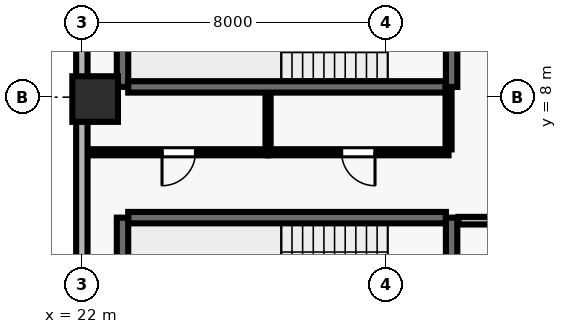
"""IFC4 building model, lengths in metres.
Left out: names, types, materials, properties, quantities, classifications, styles, units other than length and angle.
Written with IfcOpenShell. Run it as: python <this file> out.ifc"""

import sys

from ifc_helpers import new_model, si_unit, direction, frame, frame_2d, origin, origin_2d, place, context, subcontext, project, spatial, rectangle, extrude, element, fill, save


model = new_model("IFC4")
c1 = context("Model", 3, precision=1e-05, world=origin(), true_north=direction((0.0, 1.0)))
c2 = subcontext(c1, "Body", "Model", "MODEL_VIEW")
j1 = project(units=[si_unit("LENGTHUNIT", "METRE"), si_unit("PLANEANGLEUNIT", "RADIAN")], contexts=[c1])
p1 = place(None, origin())
s1 = spatial("IfcSite", under=j1, at=p1, CompositionType="ELEMENT")
p2 = place(p1, origin())
s2 = spatial("IfcBuilding", under=s1, at=p2, CompositionType="ELEMENT")
p3 = place(p2, frame((0.0, 0.0, 134.6)))
s3 = spatial("IfcBuildingStorey", under=s2, at=p3, CompositionType="ELEMENT", Elevation=134.6)
p4 = place(p3, frame((22.35, 7.95, 0.0), z_axis=(0.0, 0.0, 1.0), x_axis=(1.0, 0.0, 0.0)))
e1 = element("IfcColumn", 1, at=p4, inside=s3, PredefinedType="COLUMN", context=c2, shape_type="SweptSolid", body=[
    extrude(rectangle(XDim=1.2, YDim=1.2, at=origin_2d()), origin(), (0.0, 0.0, 1.0), 3.9),
])
p5 = place(p3, frame((22.0, 46.1, 0.0), z_axis=(0.0, 0.0, 1.0), x_axis=(0.0, -1.0, 0.0)))
e2 = element("IfcWall", 2, at=p5, inside=s3, PredefinedType="SOLIDWALL", context=c2, shape_type="SweptSolid", body=[
    extrude(rectangle(XDim=43.6, YDim=0.3, at=frame_2d((21.8, 0.0))), origin(), (0.0, 0.0, 1.0), 3.69),
])
p6 = place(p5, frame((12.7, 0.0, 0.0)))
e3 = element("IfcOpeningElement", 3, at=p6, cuts=e2, PredefinedType="OPENING", context=c2, shape_type="SweptSolid", body=[
    extrude(rectangle(XDim=1.0, YDim=2.2, at=frame_2d((0.5, 1.1))), frame((0.0, 0.16, 0.0), z_axis=(0.0, -1.0, 0.0), x_axis=(1.0, 0.0, 0.0)), (0.0, 0.0, 1.0), 0.32),
])
p7 = place(p5, frame((1.325, 0.0, 0.9)))
e4 = element("IfcOpeningElement", 4, at=p7, cuts=e2, PredefinedType="OPENING", context=c2, shape_type="SweptSolid", body=[
    extrude(rectangle(XDim=2.8, YDim=1.8, at=frame_2d((1.4, 0.9))), frame((0.0, 0.16, 0.0), z_axis=(0.0, -1.0, 0.0), x_axis=(1.0, 0.0, 0.0)), (0.0, 0.0, 1.0), 0.32),
])
p8 = place(p5, frame((23.575, 0.0, 0.9)))
e5 = element("IfcOpeningElement", 5, at=p8, cuts=e2, PredefinedType="OPENING", context=c2, shape_type="SweptSolid", body=[
    extrude(rectangle(XDim=2.8, YDim=1.8, at=frame_2d((1.4, 0.9))), frame((0.0, 0.16, 0.0), z_axis=(0.0, -1.0, 0.0), x_axis=(1.0, 0.0, 0.0)), (0.0, 0.0, 1.0), 0.32),
])
p9 = place(p5, frame((27.675, 0.0, 0.9)))
e6 = element("IfcOpeningElement", 6, at=p9, cuts=e2, PredefinedType="OPENING", context=c2, shape_type="SweptSolid", body=[
    extrude(rectangle(XDim=2.8, YDim=1.8, at=frame_2d((1.4, 0.9))), frame((0.0, 0.16, 0.0), z_axis=(0.0, -1.0, 0.0), x_axis=(1.0, 0.0, 0.0)), (0.0, 0.0, 1.0), 0.32),
])
p10 = place(p5, frame((34.025, 0.0, 0.9)))
e7 = element("IfcOpeningElement", 7, at=p10, cuts=e2, PredefinedType="OPENING", context=c2, shape_type="SweptSolid", body=[
    extrude(rectangle(XDim=2.8, YDim=1.8, at=frame_2d((1.4, 0.9))), frame((0.0, 0.16, 0.0), z_axis=(0.0, -1.0, 0.0), x_axis=(1.0, 0.0, 0.0)), (0.0, 0.0, 1.0), 0.32),
])
p11 = place(p3, frame((31.58, 4.83, 0.0), z_axis=(0.0, 0.0, 1.0), x_axis=(-1.0, 0.0, 0.0)))
e8 = element("IfcWall", 8, at=p11, inside=s3, PredefinedType="SHEAR", context=c2, shape_type="SweptSolid", body=[
    extrude(rectangle(XDim=8.36, YDim=0.3, at=frame_2d((4.18, 0.0))), origin(), (0.0, 0.0, 1.0), 3.69),
])
p12 = place(p3, frame((23.07, 4.83, 0.0), z_axis=(0.0, 0.0, 1.0), x_axis=(0.0, -1.0, 0.0)))
e9 = element("IfcWall", 9, at=p12, inside=s3, PredefinedType="SHEAR", context=c2, shape_type="SweptSolid", body=[
    extrude(rectangle(XDim=3.51, YDim=0.3, at=frame_2d((1.755, 0.0))), origin(), (0.0, 0.0, 1.0), 3.69),
])
p13 = place(p3, frame((31.73, 0.96, 0.0), z_axis=(0.0, 0.0, 1.0), x_axis=(0.0, 1.0, 0.0)))
e10 = element("IfcWall", 10, at=p13, inside=s3, PredefinedType="SHEAR", context=c2, shape_type="SweptSolid", body=[
    extrude(rectangle(XDim=3.87, YDim=0.3, at=frame_2d((1.935, 0.0))), origin(), (0.0, 0.0, 1.0), 3.69),
])
p14 = place(p13, frame((1.54, 0.0, 0.0)))
e11 = element("IfcOpeningElement", 11, at=p14, cuts=e10, PredefinedType="OPENING", context=c2, shape_type="SweptSolid", body=[
    extrude(rectangle(XDim=1.15, YDim=2.15, at=frame_2d((0.575, 1.075))), frame((0.0, 0.16, 0.0), z_axis=(0.0, -1.0, 0.0), x_axis=(1.0, 0.0, 0.0)), (0.0, 0.0, 1.0), 0.32),
])
p15 = place(p3, frame((23.07, 11.78, 0.0), z_axis=(0.0, 0.0, 1.0), x_axis=(0.0, -1.0, 0.0)))
e12 = element("IfcWall", 12, at=p15, inside=s3, PredefinedType="SHEAR", context=c2, shape_type="SweptSolid", body=[
    extrude(rectangle(XDim=3.51, YDim=0.3, at=frame_2d((1.755, 0.0))), origin(), (0.0, 0.0, 1.0), 3.69),
])
p16 = place(p3, frame((23.22, 8.27, 0.0), z_axis=(0.0, 0.0, 1.0), x_axis=(1.0, 0.0, 0.0)))
e13 = element("IfcWall", 13, at=p16, inside=s3, PredefinedType="SHEAR", context=c2, shape_type="SweptSolid", body=[
    extrude(rectangle(XDim=8.36, YDim=0.3, at=frame_2d((4.18, 0.0))), origin(), (0.0, 0.0, 1.0), 3.69),
])
p17 = place(p3, frame((31.73, 8.27, 0.0), z_axis=(0.0, 0.0, 1.0), x_axis=(0.0, 1.0, 0.0)))
e14 = element("IfcWall", 14, at=p17, inside=s3, PredefinedType="SHEAR", context=c2, shape_type="SweptSolid", body=[
    extrude(rectangle(XDim=3.51, YDim=0.3, at=frame_2d((1.755, 0.0))), origin(), (0.0, 0.0, 1.0), 3.69),
])
p18 = place(p17, frame((1.18, 0.0, 0.0)))
e15 = element("IfcOpeningElement", 15, at=p18, cuts=e14, PredefinedType="OPENING", context=c2, shape_type="SweptSolid", body=[
    extrude(rectangle(XDim=1.15, YDim=2.15, at=frame_2d((0.575, 1.075))), frame((0.0, 0.16, 0.0), z_axis=(0.0, -1.0, 0.0), x_axis=(1.0, 0.0, 0.0)), (0.0, 0.0, 1.0), 0.32),
])
p19 = place(p3, frame((26.9, 6.55, 0.0), z_axis=(0.0, 0.0, 1.0), x_axis=(-1.0, 0.0, 0.0)))
e16 = element("IfcWall", 16, at=p19, inside=s3, PredefinedType="PARTITIONING", context=c2, shape_type="SweptSolid", body=[
    extrude(rectangle(XDim=4.7, YDim=0.16, at=frame_2d((2.35, 0.0))), origin(), (0.0, 0.0, 1.0), 3.69),
])
p20 = place(p19, frame((1.91, 0.0, 0.0)))
e17 = element("IfcOpeningElement", 17, at=p20, cuts=e16, PredefinedType="OPENING", context=c2, shape_type="SweptSolid", body=[
    extrude(rectangle(XDim=0.88, YDim=2.1, at=frame_2d((0.44, 1.05))), frame((0.0, 0.09, 0.0), z_axis=(0.0, -1.0, 0.0), x_axis=(1.0, 0.0, 0.0)), (0.0, 0.0, 1.0), 0.18),
])
p21 = place(p3, frame((31.65, 6.55, 0.0), z_axis=(0.0, 0.0, 1.0), x_axis=(-1.0, 0.0, 0.0)))
e18 = element("IfcWall", 18, at=p21, inside=s3, PredefinedType="PARTITIONING", context=c2, shape_type="SweptSolid", body=[
    extrude(rectangle(XDim=4.75, YDim=0.16, at=frame_2d((2.375, 0.0))), origin(), (0.0, 0.0, 1.0), 3.69),
])
p22 = place(p21, frame((1.935, 0.0, 0.0)))
e19 = element("IfcOpeningElement", 19, at=p22, cuts=e18, PredefinedType="OPENING", context=c2, shape_type="SweptSolid", body=[
    extrude(rectangle(XDim=0.88, YDim=2.1, at=frame_2d((0.44, 1.05))), frame((0.0, 0.09, 0.0), z_axis=(0.0, -1.0, 0.0), x_axis=(1.0, 0.0, 0.0)), (0.0, 0.0, 1.0), 0.18),
])
p23 = place(p3, frame((35.02, 4.75, 0.0), z_axis=(0.0, 0.0, 1.0), x_axis=(-1.0, 0.0, 0.0)))
e20 = element("IfcWall", 20, at=p23, inside=s3, PredefinedType="SOLIDWALL", context=c2, shape_type="SweptSolid", body=[
    extrude(rectangle(XDim=3.11, YDim=0.2, at=frame_2d((1.555, 0.0))), origin(), (0.0, 0.0, 1.0), 3.69),
])
p24 = place(p23, frame((1.03, 0.0, 0.0)))
e21 = element("IfcOpeningElement", 21, at=p24, cuts=e20, PredefinedType="OPENING", context=c2, shape_type="SweptSolid", body=[
    extrude(rectangle(XDim=1.05, YDim=2.15, at=frame_2d((0.525, 1.075))), frame((0.0, 0.11, 0.0), z_axis=(0.0, -1.0, 0.0), x_axis=(1.0, 0.0, 0.0)), (0.0, 0.0, 1.0), 0.22),
])
p25 = place(p3, frame((26.9, 6.625, 0.0), z_axis=(0.0, 0.0, 1.0), x_axis=(0.0, 1.0, 0.0)))
e22 = element("IfcWall", 22, at=p25, inside=s3, PredefinedType="PARTITIONING", context=c2, shape_type="SweptSolid", body=[
    extrude(rectangle(XDim=1.465, YDim=0.135, at=frame_2d((0.732, 0.0))), origin(), (0.0, 0.0, 1.0), 3.69),
])
p26 = place(p3, frame((31.65, 8.24, 0.0), z_axis=(0.0, 0.0, 1.0), x_axis=(0.0, -1.0, 0.0)))
e23 = element("IfcWall", 23, at=p26, inside=s3, PredefinedType="PARTITIONING", context=c2, shape_type="SweptSolid", body=[
    extrude(rectangle(XDim=1.615, YDim=0.16, at=frame_2d((0.808, 0.0))), origin(), (0.0, 0.0, 1.0), 3.69),
])
p27 = place(p20, origin())
e24 = element("IfcDoor", 24, at=p27, inside=s3, OperationType="SINGLE_SWING_RIGHT", PredefinedType="DOOR", context=c2, shape_type="SweptSolid", body=[
    extrude(rectangle(XDim=0.88, YDim=2.1, at=frame_2d((0.44, 1.05))), frame((0.0, 0.025, 0.0), z_axis=(0.0, -1.0, 0.0), x_axis=(1.0, 0.0, 0.0)), (0.0, 0.0, 1.0), 0.05),
])
fill(e17, e24)
p28 = place(p22, origin())
e25 = element("IfcDoor", 25, at=p28, inside=s3, OperationType="SINGLE_SWING_LEFT", PredefinedType="DOOR", context=c2, shape_type="SweptSolid", body=[
    extrude(rectangle(XDim=0.88, YDim=2.1, at=frame_2d((0.44, 1.05))), frame((0.0, 0.025, 0.0), z_axis=(0.0, -1.0, 0.0), x_axis=(1.0, 0.0, 0.0)), (0.0, 0.0, 1.0), 0.05),
])
fill(e19, e25)
save(model, sys.argv[1])
